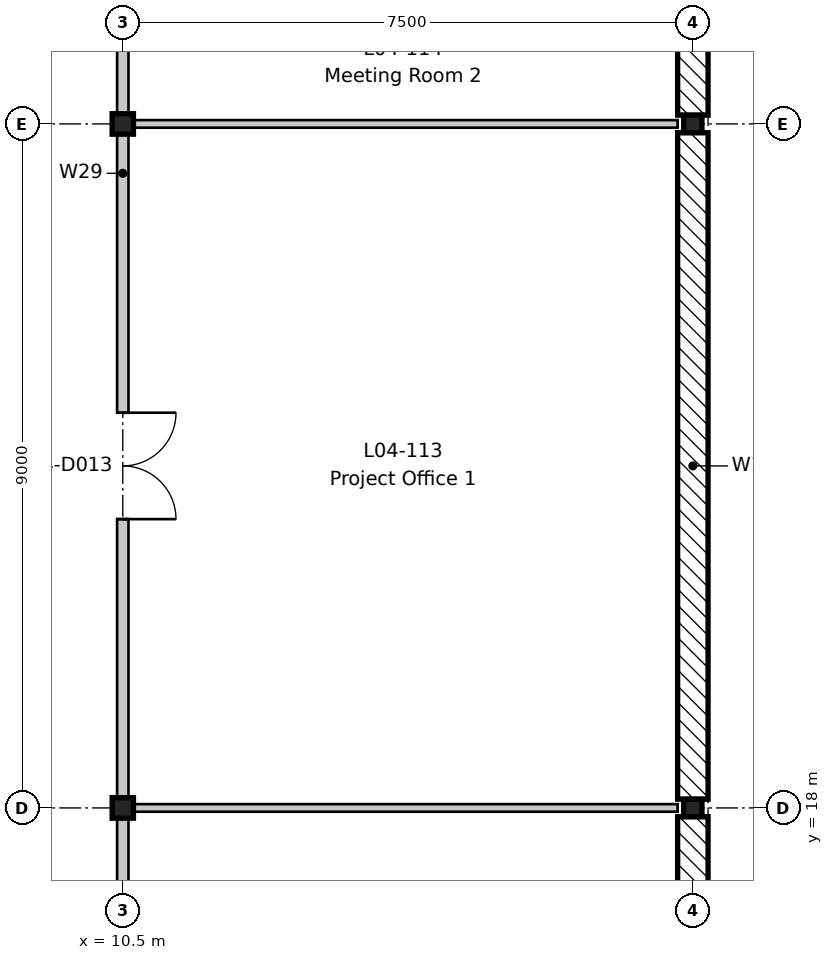
"""IFC4 building model, lengths in metres.
Left out: names, types, materials, properties, quantities, classifications, styles, units other than length and angle.
Written with IfcOpenShell. Run it as: python <this file> out.ifc"""

import sys

from ifc_helpers import new_model, si_unit, direction, frame, frame_2d, origin, origin_2d, place, context, subcontext, project, spatial, rectangle, i_section, extrude, element, fill, save


model = new_model("IFC4")
c1 = context("Model", 3, precision=1e-05, world=origin(), true_north=direction((0.0, 1.0)))
c2 = subcontext(c1, "Body", "Model", "MODEL_VIEW")
j1 = project(units=[si_unit("LENGTHUNIT", "METRE"), si_unit("PLANEANGLEUNIT", "RADIAN")], contexts=[c1])
p1 = place(None, origin())
s1 = spatial("IfcSite", under=j1, at=p1, CompositionType="ELEMENT")
p2 = place(p1, origin())
s2 = spatial("IfcBuilding", under=s1, at=p2, CompositionType="ELEMENT")
p3 = place(p2, frame((0.0, 0.0, 18.6)))
s3 = spatial("IfcBuildingStorey", under=s2, at=p3, CompositionType="ELEMENT", Elevation=18.6)
for number, where, z_axis, x_axis in (
    (1, (10.5, 18.0, -0.2), (0.0, 0.0, 1.0), (1.0, 0.0, 0.0)),
    (2, (10.5, 27.0, -0.2), (0.0, 0.0, 1.0), (1.0, 0.0, 0.0)),
):
    element("IfcColumn", number, at=place(p3, frame(where, z_axis=z_axis, x_axis=x_axis)), inside=s3, PredefinedType="COLUMN", context=c2, shape_type="SweptSolid", body=[
        extrude(i_section(OverallWidth=0.28, OverallDepth=0.27, WebThickness=0.008, FlangeThickness=0.013, FilletRadius=0.024, at=origin_2d()), origin(), (0.0, 0.0, 1.0), 4.2),
    ])
for number, where, z_axis, x_axis in (
    (3, (18.0, 18.0, -0.2), (0.0, 0.0, 1.0), (1.0, 0.0, 0.0)),
    (4, (18.0, 27.0, -0.2), (0.0, 0.0, 1.0), (1.0, 0.0, 0.0)),
):
    element("IfcColumn", number, at=place(p3, frame(where, z_axis=z_axis, x_axis=x_axis)), inside=s3, PredefinedType="COLUMN", context=c2, shape_type="SweptSolid", body=[
        extrude(i_section(OverallWidth=0.24, OverallDepth=0.23, WebThickness=0.008, FlangeThickness=0.012, FilletRadius=0.021, at=origin_2d()), origin(), (0.0, 0.0, 1.0), 4.2),
    ])
p4 = place(p3, frame((18.0, 17.885, 0.0), z_axis=(0.0, 0.0, 1.0), x_axis=(0.0, -1.0, 0.0)))
e5 = element("IfcWall", 5, at=p4, inside=s3, PredefinedType="STANDARD", context=c2, shape_type="SweptSolid", body=[
    extrude(rectangle(XDim=8.77, YDim=0.4, at=frame_2d((4.385, 0.0))), origin(), (0.0, 0.0, 1.0), 3.6),
])
p5 = place(p4, frame((6.035, 0.0, 0.6)))
e6 = element("IfcOpeningElement", 6, at=p5, cuts=e5, PredefinedType="OPENING", context=c2, shape_type="SweptSolid", body=[
    extrude(rectangle(XDim=1.2, YDim=2.7, at=frame_2d((0.6, 1.35))), frame((0.0, 0.21, 0.0), z_axis=(0.0, -1.0, 0.0), x_axis=(1.0, 0.0, 0.0)), (0.0, 0.0, 1.0), 0.42),
])
p6 = place(p4, frame((4.535, 0.0, 0.6)))
e7 = element("IfcOpeningElement", 7, at=p6, cuts=e5, PredefinedType="OPENING", context=c2, shape_type="SweptSolid", body=[
    extrude(rectangle(XDim=1.2, YDim=2.7, at=frame_2d((0.6, 1.35))), frame((0.0, 0.21, 0.0), z_axis=(0.0, -1.0, 0.0), x_axis=(1.0, 0.0, 0.0)), (0.0, 0.0, 1.0), 0.42),
])
p7 = place(p4, frame((3.035, 0.0, 0.6)))
e8 = element("IfcOpeningElement", 8, at=p7, cuts=e5, PredefinedType="OPENING", context=c2, shape_type="SweptSolid", body=[
    extrude(rectangle(XDim=1.2, YDim=2.7, at=frame_2d((0.6, 1.35))), frame((0.0, 0.21, 0.0), z_axis=(0.0, -1.0, 0.0), x_axis=(1.0, 0.0, 0.0)), (0.0, 0.0, 1.0), 0.42),
])
p8 = place(p4, frame((1.535, 0.0, 0.6)))
e9 = element("IfcOpeningElement", 9, at=p8, cuts=e5, PredefinedType="OPENING", context=c2, shape_type="SweptSolid", body=[
    extrude(rectangle(XDim=1.2, YDim=2.7, at=frame_2d((0.6, 1.35))), frame((0.0, 0.21, 0.0), z_axis=(0.0, -1.0, 0.0), x_axis=(1.0, 0.0, 0.0)), (0.0, 0.0, 1.0), 0.42),
])
p9 = place(p3, frame((18.0, 26.885, 0.0), z_axis=(0.0, 0.0, 1.0), x_axis=(0.0, -1.0, 0.0)))
e10 = element("IfcWall", 10, at=p9, inside=s3, PredefinedType="STANDARD", context=c2, shape_type="SweptSolid", body=[
    extrude(rectangle(XDim=8.77, YDim=0.4, at=frame_2d((4.385, 0.0))), origin(), (0.0, 0.0, 1.0), 3.6),
])
p10 = place(p3, frame((18.0, 35.885, 0.0), z_axis=(0.0, 0.0, 1.0), x_axis=(0.0, -1.0, 0.0)))
e11 = element("IfcWall", 11, at=p10, inside=s3, PredefinedType="STANDARD", context=c2, shape_type="SweptSolid", body=[
    extrude(rectangle(XDim=8.77, YDim=0.4, at=frame_2d((4.385, 0.0))), origin(), (0.0, 0.0, 1.0), 3.6),
])
p11 = place(p10, frame((6.035, 0.0, 0.6)))
e12 = element("IfcOpeningElement", 12, at=p11, cuts=e11, PredefinedType="OPENING", context=c2, shape_type="SweptSolid", body=[
    extrude(rectangle(XDim=1.2, YDim=2.7, at=frame_2d((0.6, 1.35))), frame((0.0, 0.21, 0.0), z_axis=(0.0, -1.0, 0.0), x_axis=(1.0, 0.0, 0.0)), (0.0, 0.0, 1.0), 0.42),
])
p12 = place(p10, frame((4.535, 0.0, 0.6)))
e13 = element("IfcOpeningElement", 13, at=p12, cuts=e11, PredefinedType="OPENING", context=c2, shape_type="SweptSolid", body=[
    extrude(rectangle(XDim=1.2, YDim=2.7, at=frame_2d((0.6, 1.35))), frame((0.0, 0.21, 0.0), z_axis=(0.0, -1.0, 0.0), x_axis=(1.0, 0.0, 0.0)), (0.0, 0.0, 1.0), 0.42),
])
p13 = place(p10, frame((3.035, 0.0, 0.6)))
e14 = element("IfcOpeningElement", 14, at=p13, cuts=e11, PredefinedType="OPENING", context=c2, shape_type="SweptSolid", body=[
    extrude(rectangle(XDim=1.2, YDim=2.7, at=frame_2d((0.6, 1.35))), frame((0.0, 0.21, 0.0), z_axis=(0.0, -1.0, 0.0), x_axis=(1.0, 0.0, 0.0)), (0.0, 0.0, 1.0), 0.42),
])
p14 = place(p10, frame((1.535, 0.0, 0.6)))
e15 = element("IfcOpeningElement", 15, at=p14, cuts=e11, PredefinedType="OPENING", context=c2, shape_type="SweptSolid", body=[
    extrude(rectangle(XDim=1.2, YDim=2.7, at=frame_2d((0.6, 1.35))), frame((0.0, 0.21, 0.0), z_axis=(0.0, -1.0, 0.0), x_axis=(1.0, 0.0, 0.0)), (0.0, 0.0, 1.0), 0.42),
])
for number, where, z_axis, x_axis in (
    (16, (10.575, 18.0, 0.0), (0.0, 0.0, 1.0), (1.0, 0.0, 0.0)),
    (17, (10.575, 27.0, 0.0), (0.0, 0.0, 1.0), (1.0, 0.0, 0.0)),
):
    element("IfcWall", number, at=place(p3, frame(where, z_axis=z_axis, x_axis=x_axis)), inside=s3, PredefinedType="PARTITIONING", context=c2, shape_type="SweptSolid", body=[
        extrude(rectangle(XDim=7.225, YDim=0.1, at=frame_2d((3.613, 0.0))), origin(), (0.0, 0.0, 1.0), 3.65),
    ])
p15 = place(p3, frame((10.5, -8.8, 0.0), z_axis=(0.0, 0.0, 1.0), x_axis=(0.0, 1.0, 0.0)))
e18 = element("IfcWall", 18, at=p15, inside=s3, PredefinedType="PARTITIONING", context=c2, shape_type="SweptSolid", body=[
    extrude(rectangle(XDim=79.3, YDim=0.15, at=frame_2d((39.65, 0.0))), origin(), (0.0, 0.0, 1.0), 3.48),
])
p16 = place(p15, frame((2.3, 0.0, 0.0)))
e19 = element("IfcOpeningElement", 19, at=p16, cuts=e18, PredefinedType="OPENING", context=c2, shape_type="SweptSolid", body=[
    extrude(rectangle(XDim=1.0, YDim=2.1, at=frame_2d((0.5, 1.05))), frame((0.0, 0.085, 0.0), z_axis=(0.0, -1.0, 0.0), x_axis=(1.0, 0.0, 0.0)), (0.0, 0.0, 1.0), 0.17),
])
p17 = place(p15, frame((9.55, 0.0, 0.0)))
e20 = element("IfcOpeningElement", 20, at=p17, cuts=e18, PredefinedType="OPENING", context=c2, shape_type="SweptSolid", body=[
    extrude(rectangle(XDim=1.0, YDim=2.1, at=frame_2d((0.5, 1.05))), frame((0.0, 0.085, 0.0), z_axis=(0.0, -1.0, 0.0), x_axis=(1.0, 0.0, 0.0)), (0.0, 0.0, 1.0), 0.17),
])
p18 = place(p15, frame((15.6, 0.0, 0.0)))
e21 = element("IfcOpeningElement", 21, at=p18, cuts=e18, PredefinedType="OPENING", context=c2, shape_type="SweptSolid", body=[
    extrude(rectangle(XDim=1.4, YDim=2.1, at=frame_2d((0.7, 1.05))), frame((0.0, 0.085, 0.0), z_axis=(0.0, -1.0, 0.0), x_axis=(1.0, 0.0, 0.0)), (0.0, 0.0, 1.0), 0.17),
])
p19 = place(p15, frame((21.8, 0.0, 0.0)))
e22 = element("IfcOpeningElement", 22, at=p19, cuts=e18, PredefinedType="OPENING", context=c2, shape_type="SweptSolid", body=[
    extrude(rectangle(XDim=1.0, YDim=2.1, at=frame_2d((0.5, 1.05))), frame((0.0, 0.085, 0.0), z_axis=(0.0, -1.0, 0.0), x_axis=(1.0, 0.0, 0.0)), (0.0, 0.0, 1.0), 0.17),
])
p20 = place(p15, frame((24.8, 0.0, 0.0)))
e23 = element("IfcOpeningElement", 23, at=p20, cuts=e18, PredefinedType="OPENING", context=c2, shape_type="SweptSolid", body=[
    extrude(rectangle(XDim=1.0, YDim=2.1, at=frame_2d((0.5, 1.05))), frame((0.0, 0.085, 0.0), z_axis=(0.0, -1.0, 0.0), x_axis=(1.0, 0.0, 0.0)), (0.0, 0.0, 1.0), 0.17),
])
p21 = place(p15, frame((30.6, 0.0, 0.0)))
e24 = element("IfcOpeningElement", 24, at=p21, cuts=e18, PredefinedType="OPENING", context=c2, shape_type="SweptSolid", body=[
    extrude(rectangle(XDim=1.4, YDim=2.1, at=frame_2d((0.7, 1.05))), frame((0.0, 0.085, 0.0), z_axis=(0.0, -1.0, 0.0), x_axis=(1.0, 0.0, 0.0)), (0.0, 0.0, 1.0), 0.17),
])
p22 = place(p15, frame((38.3, 0.0, 0.0)))
e25 = element("IfcOpeningElement", 25, at=p22, cuts=e18, PredefinedType="OPENING", context=c2, shape_type="SweptSolid", body=[
    extrude(rectangle(XDim=1.0, YDim=2.1, at=frame_2d((0.5, 1.05))), frame((0.0, 0.085, 0.0), z_axis=(0.0, -1.0, 0.0), x_axis=(1.0, 0.0, 0.0)), (0.0, 0.0, 1.0), 0.17),
])
p23 = place(p15, frame((42.8, 0.0, 0.0)))
e26 = element("IfcOpeningElement", 26, at=p23, cuts=e18, PredefinedType="OPENING", context=c2, shape_type="SweptSolid", body=[
    extrude(rectangle(XDim=1.0, YDim=2.1, at=frame_2d((0.5, 1.05))), frame((0.0, 0.085, 0.0), z_axis=(0.0, -1.0, 0.0), x_axis=(1.0, 0.0, 0.0)), (0.0, 0.0, 1.0), 0.17),
])
p24 = place(p15, frame((45.8, 0.0, 0.0)))
e27 = element("IfcOpeningElement", 27, at=p24, cuts=e18, PredefinedType="OPENING", context=c2, shape_type="SweptSolid", body=[
    extrude(rectangle(XDim=1.0, YDim=2.1, at=frame_2d((0.5, 1.05))), frame((0.0, 0.085, 0.0), z_axis=(0.0, -1.0, 0.0), x_axis=(1.0, 0.0, 0.0)), (0.0, 0.0, 1.0), 0.17),
])
p25 = place(p15, frame((50.3, 0.0, 0.0)))
e28 = element("IfcOpeningElement", 28, at=p25, cuts=e18, PredefinedType="OPENING", context=c2, shape_type="SweptSolid", body=[
    extrude(rectangle(XDim=1.0, YDim=2.1, at=frame_2d((0.5, 1.05))), frame((0.0, 0.085, 0.0), z_axis=(0.0, -1.0, 0.0), x_axis=(1.0, 0.0, 0.0)), (0.0, 0.0, 1.0), 0.17),
])
p26 = place(p15, frame((54.8, 0.0, 0.0)))
e29 = element("IfcOpeningElement", 29, at=p26, cuts=e18, PredefinedType="OPENING", context=c2, shape_type="SweptSolid", body=[
    extrude(rectangle(XDim=1.0, YDim=2.1, at=frame_2d((0.5, 1.05))), frame((0.0, 0.085, 0.0), z_axis=(0.0, -1.0, 0.0), x_axis=(1.0, 0.0, 0.0)), (0.0, 0.0, 1.0), 0.17),
])
p27 = place(p15, frame((57.8, 0.0, 0.0)))
e30 = element("IfcOpeningElement", 30, at=p27, cuts=e18, PredefinedType="OPENING", context=c2, shape_type="SweptSolid", body=[
    extrude(rectangle(XDim=1.0, YDim=2.1, at=frame_2d((0.5, 1.05))), frame((0.0, 0.085, 0.0), z_axis=(0.0, -1.0, 0.0), x_axis=(1.0, 0.0, 0.0)), (0.0, 0.0, 1.0), 0.17),
])
p28 = place(p15, frame((63.6, 0.0, 0.0)))
e31 = element("IfcOpeningElement", 31, at=p28, cuts=e18, PredefinedType="OPENING", context=c2, shape_type="SweptSolid", body=[
    extrude(rectangle(XDim=1.4, YDim=2.1, at=frame_2d((0.7, 1.05))), frame((0.0, 0.085, 0.0), z_axis=(0.0, -1.0, 0.0), x_axis=(1.0, 0.0, 0.0)), (0.0, 0.0, 1.0), 0.17),
])
p29 = place(p15, frame((69.8, 0.0, 0.0)))
e32 = element("IfcOpeningElement", 32, at=p29, cuts=e18, PredefinedType="OPENING", context=c2, shape_type="SweptSolid", body=[
    extrude(rectangle(XDim=1.0, YDim=2.1, at=frame_2d((0.5, 1.05))), frame((0.0, 0.085, 0.0), z_axis=(0.0, -1.0, 0.0), x_axis=(1.0, 0.0, 0.0)), (0.0, 0.0, 1.0), 0.17),
])
p30 = place(p15, frame((72.8, 0.0, 0.0)))
e33 = element("IfcOpeningElement", 33, at=p30, cuts=e18, PredefinedType="OPENING", context=c2, shape_type="SweptSolid", body=[
    extrude(rectangle(XDim=1.0, YDim=2.1, at=frame_2d((0.5, 1.05))), frame((0.0, 0.085, 0.0), z_axis=(0.0, -1.0, 0.0), x_axis=(1.0, 0.0, 0.0)), (0.0, 0.0, 1.0), 0.17),
])
p31 = place(p21, frame((1.4, 0.0, 0.0), z_axis=(0.0, 0.0, 1.0), x_axis=(-1.0, 0.0, 0.0)))
e34 = element("IfcDoor", 34, at=p31, inside=s3, OperationType="DOUBLE_DOOR_SINGLE_SWING", PredefinedType="DOOR", context=c2, shape_type="SweptSolid", body=[
    extrude(rectangle(XDim=1.4, YDim=2.1, at=frame_2d((0.7, 1.05))), frame((0.0, 0.025, 0.0), z_axis=(0.0, -1.0, 0.0), x_axis=(1.0, 0.0, 0.0)), (0.0, 0.0, 1.0), 0.05),
])
fill(e24, e34)
save(model, sys.argv[1])
